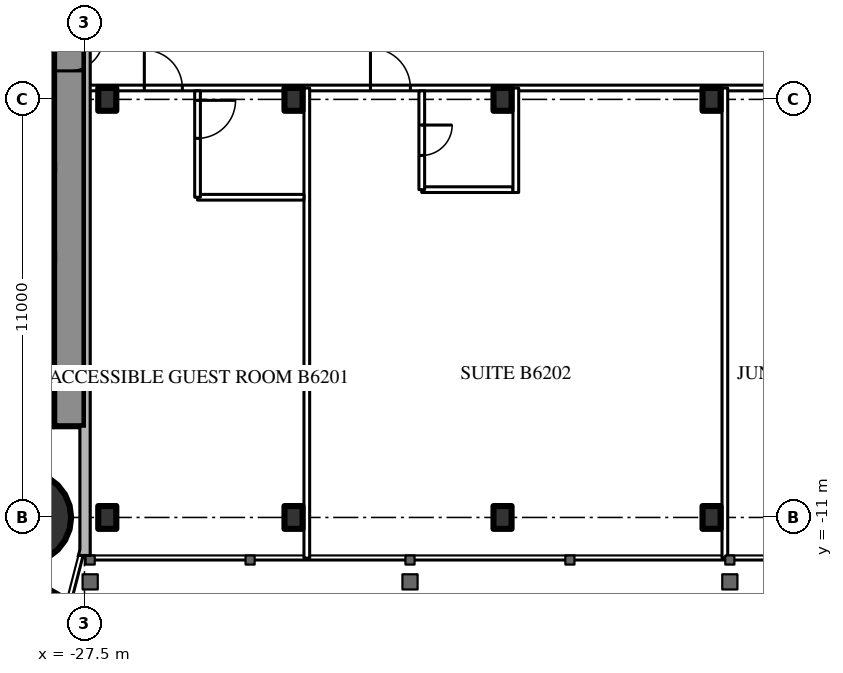
"""IFC4 building model, lengths in metres.
Left out: names, types, materials, properties, quantities, classifications, styles, units other than length and angle.
Written with IfcOpenShell. Run it as: python <this file> out.ifc"""

import sys

from ifc_helpers import new_model, si_unit, direction, frame, frame_2d, origin, origin_2d, place, context, subcontext, project, spatial, rectangle, circle, i_section, extrude, element, fill, save


model = new_model("IFC4")
c1 = context("Model", 3, precision=1e-05, world=origin(), true_north=direction((0.0, 1.0)))
c2 = subcontext(c1, "Body", "Model", "MODEL_VIEW")
j1 = project(units=[si_unit("LENGTHUNIT", "METRE"), si_unit("PLANEANGLEUNIT", "RADIAN")], contexts=[c1])
p1 = place(None, origin())
s1 = spatial("IfcSite", under=j1, at=p1, CompositionType="ELEMENT")
p2 = place(p1, origin())
s2 = spatial("IfcBuilding", under=s1, at=p2, CompositionType="ELEMENT")
p3 = place(p2, frame((0.0, 0.0, 233.3)))
s3 = spatial("IfcBuildingStorey", under=s2, at=p3, CompositionType="ELEMENT", Elevation=233.3)
p4 = place(p3, frame((-29.05, -11.0, 0.0), z_axis=(0.0, 0.0, 1.0), x_axis=(1.0, 0.0, 0.0)))
e1 = element("IfcColumn", 1, at=p4, inside=s3, PredefinedType="COLUMN", context=c2, shape_type="SweptSolid", body=[
    extrude(circle(Radius=1.2, at=origin_2d()), origin(), (0.0, 0.0, 1.0), 3.6),
])
p5 = place(p3, frame((-27.9, 8.6, 0.0), z_axis=(0.0, 0.0, 1.0), x_axis=(0.0, -1.0, 0.0)))
e2 = element("IfcWall", 2, at=p5, inside=s3, PredefinedType="SHEAR", context=c2, shape_type="SweptSolid", body=[
    extrude(rectangle(XDim=17.2, YDim=0.8, at=frame_2d((8.6, 0.0))), origin(), (0.0, 0.0, 1.0), 3.6),
])
p6 = place(p5, frame((6.95, 0.0, 0.0)))
e3 = element("IfcOpeningElement", 3, at=p6, cuts=e2, PredefinedType="OPENING", context=c2, shape_type="SweptSolid", body=[
    extrude(rectangle(XDim=0.9, YDim=2.2, at=frame_2d((0.45, 1.1))), frame((0.0, 0.41, 0.0), z_axis=(0.0, -1.0, 0.0), x_axis=(1.0, 0.0, 0.0)), (0.0, 0.0, 1.0), 0.82),
])
p7 = place(p3, frame((-28.3, -8.0, 0.0), z_axis=(0.0, 0.0, 1.0), x_axis=(-1.0, 0.0, 0.0)))
e4 = element("IfcWall", 4, at=p7, inside=s3, PredefinedType="SHEAR", context=c2, shape_type="SweptSolid", body=[
    extrude(rectangle(XDim=8.4, YDim=1.2, at=frame_2d((4.2, 0.0))), origin(), (0.0, 0.0, 1.0), 3.6),
])
p8 = place(p7, frame((0.25, 0.0, 0.0)))
e5 = element("IfcOpeningElement", 5, at=p8, cuts=e4, PredefinedType="OPENING", context=c2, shape_type="SweptSolid", body=[
    extrude(rectangle(XDim=1.0, YDim=2.2, at=frame_2d((0.5, 1.1))), frame((0.0, 0.61, 0.0), z_axis=(0.0, -1.0, 0.0), x_axis=(1.0, 0.0, 0.0)), (0.0, 0.0, 1.0), 1.22),
])
p9 = place(p3, frame((-28.3, -4.15, 0.0), z_axis=(0.0, 0.0, 1.0), x_axis=(-1.0, 0.0, 0.0)))
e6 = element("IfcWall", 6, at=p9, inside=s3, PredefinedType="SHEAR", context=c2, shape_type="SweptSolid", body=[
    extrude(rectangle(XDim=8.4, YDim=0.3, at=frame_2d((4.2, 0.0))), origin(), (0.0, 0.0, 1.0), 3.6),
])
p10 = place(p3, frame((-28.3, -1.775, 0.0), z_axis=(0.0, 0.0, 1.0), x_axis=(-1.0, 0.0, 0.0)))
e7 = element("IfcWall", 7, at=p10, inside=s3, PredefinedType="SHEAR", context=c2, shape_type="SweptSolid", body=[
    extrude(rectangle(XDim=2.9, YDim=0.25, at=frame_2d((1.45, 0.0))), origin(), (0.0, 0.0, 1.0), 3.6),
])
p11 = place(p3, frame((-27.2, 14.3, 0.0), z_axis=(0.0, 0.0, 1.0), x_axis=(-0.866026593062, -0.499997940104, 0.0)))
e8 = element("IfcWall", 8, at=p11, inside=s3, PredefinedType="SHEAR", context=c2, shape_type="SweptSolid", body=[
    extrude(rectangle(XDim=28.946, YDim=1.2, at=frame_2d((14.473, 0.0))), origin(), (0.0, 0.0, 1.0), 3.6),
])
p12 = place(p11, frame((4.6, 0.0, 0.0)))
e9 = element("IfcOpeningElement", 9, at=p12, cuts=e8, PredefinedType="OPENING", context=c2, shape_type="SweptSolid", body=[
    extrude(rectangle(XDim=1.0, YDim=2.2, at=frame_2d((0.5, 1.1))), frame((0.0, 0.61, 0.0), z_axis=(0.0, -1.0, 0.0), x_axis=(1.0, 0.0, 0.0)), (0.0, 0.0, 1.0), 1.22),
])
p13 = place(p11, frame((13.395, 0.0, 0.0)))
e10 = element("IfcOpeningElement", 10, at=p13, cuts=e8, PredefinedType="OPENING", context=c2, shape_type="SweptSolid", body=[
    extrude(rectangle(XDim=1.8, YDim=2.2, at=frame_2d((0.9, 1.1))), frame((0.0, 0.61, 0.0), z_axis=(0.0, -1.0, 0.0), x_axis=(1.0, 0.0, 0.0)), (0.0, 0.0, 1.0), 1.22),
])
p14 = place(p3, frame((-27.2, -14.3, 0.0), z_axis=(0.0, 0.0, 1.0), x_axis=(-0.866024021859, 0.500002393557, 0.0)))
e11 = element("IfcWall", 11, at=p14, inside=s3, PredefinedType="SHEAR", context=c2, shape_type="SweptSolid", body=[
    extrude(rectangle(XDim=27.907, YDim=1.2, at=frame_2d((13.954, 0.0))), origin(), (0.0, 0.0, 1.0), 3.6),
])
p15 = place(p14, frame((4.6, 0.0, 0.0)))
e12 = element("IfcOpeningElement", 12, at=p15, cuts=e11, PredefinedType="OPENING", context=c2, shape_type="SweptSolid", body=[
    extrude(rectangle(XDim=1.0, YDim=2.2, at=frame_2d((0.5, 1.1))), frame((0.0, 0.61, 0.0), z_axis=(0.0, -1.0, 0.0), x_axis=(1.0, 0.0, 0.0)), (0.0, 0.0, 1.0), 1.22),
])
p16 = place(p14, frame((13.395, 0.0, 0.0)))
e13 = element("IfcOpeningElement", 13, at=p16, cuts=e11, PredefinedType="OPENING", context=c2, shape_type="SweptSolid", body=[
    extrude(rectangle(XDim=1.8, YDim=2.2, at=frame_2d((0.9, 1.1))), frame((0.0, 0.61, 0.0), z_axis=(0.0, -1.0, 0.0), x_axis=(1.0, 0.0, 0.0)), (0.0, 0.0, 1.0), 1.22),
])
for number, where, z_axis, x_axis in (
    (14, (-26.9, -11.0, 0.0), (0.0, 0.0, 1.0), (1.0, 0.0, 0.0)),
    (15, (-22.0, -11.0, 0.0), (0.0, 0.0, 1.0), (1.0, 0.0, 0.0)),
    (16, (-16.5, -11.0, 0.0), (0.0, 0.0, 1.0), (1.0, 0.0, 0.0)),
    (17, (-11.0, -11.0, 0.0), (0.0, 0.0, 1.0), (1.0, 0.0, 0.0)),
    (18, (-26.9, 0.0, 0.0), (0.0, 0.0, 1.0), (1.0, 0.0, 0.0)),
    (19, (-22.0, 0.0, 0.0), (0.0, 0.0, 1.0), (1.0, 0.0, 0.0)),
    (20, (-16.5, 0.0, 0.0), (0.0, 0.0, 1.0), (1.0, 0.0, 0.0)),
    (21, (-11.0, 0.0, 0.0), (0.0, 0.0, 1.0), (1.0, 0.0, 0.0)),
):
    element("IfcColumn", number, at=place(p3, frame(where, z_axis=z_axis, x_axis=x_axis)), inside=s3, PredefinedType="COLUMN", context=c2, shape_type="SweptSolid", body=[
        extrude(i_section(OverallWidth=0.476, OverallDepth=0.6, WebThickness=0.1, FlangeThickness=0.14, FilletRadius=0.02, at=origin_2d()), origin(), (0.0, 0.0, 1.0), 3.6),
    ])
p17 = place(p3, frame((-27.5, 0.3, 0.0), z_axis=(0.0, 0.0, 1.0), x_axis=(1.0, 0.0, 0.0)))
e22 = element("IfcWall", 22, at=p17, inside=s3, PredefinedType="PARTITIONING", context=c2, shape_type="SweptSolid", body=[
    extrude(rectangle(XDim=55.0, YDim=0.15, at=frame_2d((27.5, 0.0))), origin(), (0.0, 0.0, 1.0), 2.4),
])
p18 = place(p17, frame((1.575, 0.0, 0.0)))
e23 = element("IfcOpeningElement", 23, at=p18, cuts=e22, PredefinedType="OPENING", context=c2, shape_type="SweptSolid", body=[
    extrude(rectangle(XDim=1.0, YDim=2.2, at=frame_2d((0.5, 1.1))), frame((0.0, 0.085, 0.0), z_axis=(0.0, -1.0, 0.0), x_axis=(1.0, 0.0, 0.0)), (0.0, 0.0, 1.0), 0.17),
])
p19 = place(p17, frame((7.525, 0.0, 0.0)))
e24 = element("IfcOpeningElement", 24, at=p19, cuts=e22, PredefinedType="OPENING", context=c2, shape_type="SweptSolid", body=[
    extrude(rectangle(XDim=1.05, YDim=2.4, at=frame_2d((0.525, 1.2))), frame((0.0, 0.085, 0.0), z_axis=(0.0, -1.0, 0.0), x_axis=(1.0, 0.0, 0.0)), (0.0, 0.0, 1.0), 0.17),
])
p20 = place(p17, frame((18.525, 0.0, 0.0)))
e25 = element("IfcOpeningElement", 25, at=p20, cuts=e22, PredefinedType="OPENING", context=c2, shape_type="SweptSolid", body=[
    extrude(rectangle(XDim=1.05, YDim=2.4, at=frame_2d((0.525, 1.2))), frame((0.0, 0.085, 0.0), z_axis=(0.0, -1.0, 0.0), x_axis=(1.0, 0.0, 0.0)), (0.0, 0.0, 1.0), 0.17),
])
p21 = place(p17, frame((24.025, 0.0, 0.0)))
e26 = element("IfcOpeningElement", 26, at=p21, cuts=e22, PredefinedType="OPENING", context=c2, shape_type="SweptSolid", body=[
    extrude(rectangle(XDim=1.05, YDim=2.4, at=frame_2d((0.525, 1.2))), frame((0.0, 0.085, 0.0), z_axis=(0.0, -1.0, 0.0), x_axis=(1.0, 0.0, 0.0)), (0.0, 0.0, 1.0), 0.17),
])
p22 = place(p17, frame((35.025, 0.0, 0.0)))
e27 = element("IfcOpeningElement", 27, at=p22, cuts=e22, PredefinedType="OPENING", context=c2, shape_type="SweptSolid", body=[
    extrude(rectangle(XDim=1.05, YDim=2.4, at=frame_2d((0.525, 1.2))), frame((0.0, 0.085, 0.0), z_axis=(0.0, -1.0, 0.0), x_axis=(1.0, 0.0, 0.0)), (0.0, 0.0, 1.0), 0.17),
])
p23 = place(p17, frame((40.525, 0.0, 0.0)))
e28 = element("IfcOpeningElement", 28, at=p23, cuts=e22, PredefinedType="OPENING", context=c2, shape_type="SweptSolid", body=[
    extrude(rectangle(XDim=1.05, YDim=2.4, at=frame_2d((0.525, 1.2))), frame((0.0, 0.085, 0.0), z_axis=(0.0, -1.0, 0.0), x_axis=(1.0, 0.0, 0.0)), (0.0, 0.0, 1.0), 0.17),
])
p24 = place(p17, frame((52.525, 0.0, 0.0)))
e29 = element("IfcOpeningElement", 29, at=p24, cuts=e22, PredefinedType="OPENING", context=c2, shape_type="SweptSolid", body=[
    extrude(rectangle(XDim=1.05, YDim=2.4, at=frame_2d((0.525, 1.2))), frame((0.0, 0.085, 0.0), z_axis=(0.0, -1.0, 0.0), x_axis=(1.0, 0.0, 0.0)), (0.0, 0.0, 1.0), 0.17),
])
for number, where, z_axis, x_axis in (
    (30, (-21.65, -12.07, 0.0), (0.0, 0.0, 1.0), (0.0, 1.0, 0.0)),
    (31, (-10.65, -12.07, 0.0), (0.0, 0.0, 1.0), (0.0, 1.0, 0.0)),
):
    element("IfcWall", number, at=place(p3, frame(where, z_axis=z_axis, x_axis=x_axis)), inside=s3, PredefinedType="PARTITIONING", context=c2, shape_type="SweptSolid", body=[
        extrude(rectangle(XDim=12.37, YDim=0.15, at=frame_2d((6.185, 0.0))), origin(), (0.0, 0.0, 1.0), 3.4),
    ])
p25 = place(p3, frame((-24.525, -2.575, 0.0), z_axis=(0.0, 0.0, 1.0), x_axis=(1.0, 0.0, 0.0)))
e32 = element("IfcWall", 32, at=p25, inside=s3, PredefinedType="PARTITIONING", context=c2, shape_type="SweptSolid", body=[
    extrude(rectangle(XDim=2.8, YDim=0.15, at=frame_2d((1.4, 0.0))), origin(), (0.0, 0.0, 1.0), 3.4),
])
p26 = place(p3, frame((-24.525, -2.575, 0.0), z_axis=(0.0, 0.0, 1.0), x_axis=(0.0, 1.0, 0.0)))
e33 = element("IfcWall", 33, at=p26, inside=s3, PredefinedType="PARTITIONING", context=c2, shape_type="SweptSolid", body=[
    extrude(rectangle(XDim=2.8, YDim=0.15, at=frame_2d((1.4, 0.0))), origin(), (0.0, 0.0, 1.0), 3.4),
])
p27 = place(p26, frame((1.55, 0.0, 0.0)))
e34 = element("IfcOpeningElement", 34, at=p27, cuts=e33, PredefinedType="OPENING", context=c2, shape_type="SweptSolid", body=[
    extrude(rectangle(XDim=1.0, YDim=2.2, at=frame_2d((0.5, 1.1))), frame((0.0, 0.085, 0.0), z_axis=(0.0, -1.0, 0.0), x_axis=(1.0, 0.0, 0.0)), (0.0, 0.0, 1.0), 0.17),
])
p28 = place(p3, frame((-18.625, -2.375, 0.0), z_axis=(0.0, 0.0, 1.0), x_axis=(1.0, 0.0, 0.0)))
e35 = element("IfcWall", 35, at=p28, inside=s3, PredefinedType="PARTITIONING", context=c2, shape_type="SweptSolid", body=[
    extrude(rectangle(XDim=2.4, YDim=0.15, at=frame_2d((1.2, 0.0))), origin(), (0.0, 0.0, 1.0), 3.4),
])
p29 = place(p3, frame((-18.625, -2.375, 0.0), z_axis=(0.0, 0.0, 1.0), x_axis=(0.0, 1.0, 0.0)))
e36 = element("IfcWall", 36, at=p29, inside=s3, PredefinedType="PARTITIONING", context=c2, shape_type="SweptSolid", body=[
    extrude(rectangle(XDim=2.6, YDim=0.15, at=frame_2d((1.3, 0.0))), origin(), (0.0, 0.0, 1.0), 3.4),
])
p30 = place(p29, frame((0.9, 0.0, 0.0)))
e37 = element("IfcOpeningElement", 37, at=p30, cuts=e36, PredefinedType="OPENING", context=c2, shape_type="SweptSolid", body=[
    extrude(rectangle(XDim=0.8, YDim=2.2, at=frame_2d((0.4, 1.1))), frame((0.0, 0.085, 0.0), z_axis=(0.0, -1.0, 0.0), x_axis=(1.0, 0.0, 0.0)), (0.0, 0.0, 1.0), 0.17),
])
p31 = place(p3, frame((-16.15, -2.45, 0.0), z_axis=(0.0, 0.0, 1.0), x_axis=(0.0, 1.0, 0.0)))
e38 = element("IfcWall", 38, at=p31, inside=s3, PredefinedType="PARTITIONING", context=c2, shape_type="SweptSolid", body=[
    extrude(rectangle(XDim=2.75, YDim=0.15, at=frame_2d((1.375, 0.0))), origin(), (0.0, 0.0, 1.0), 3.4),
])
p32 = place(p6, origin())
e39 = element("IfcDoor", 39, at=p32, inside=s3, OperationType="SINGLE_SWING_LEFT", PredefinedType="DOOR", context=c2, shape_type="SweptSolid", body=[
    extrude(rectangle(XDim=0.9, YDim=2.2, at=frame_2d((0.45, 1.1))), frame((0.0, 0.025, 0.0), z_axis=(0.0, -1.0, 0.0), x_axis=(1.0, 0.0, 0.0)), (0.0, 0.0, 1.0), 0.05),
])
fill(e3, e39)
p33 = place(p27, origin())
e40 = element("IfcDoor", 40, at=p33, inside=s3, OperationType="SINGLE_SWING_RIGHT", PredefinedType="DOOR", context=c2, shape_type="SweptSolid", body=[
    extrude(rectangle(XDim=1.0, YDim=2.2, at=frame_2d((0.5, 1.1))), frame((0.0, 0.025, 0.0), z_axis=(0.0, -1.0, 0.0), x_axis=(1.0, 0.0, 0.0)), (0.0, 0.0, 1.0), 0.05),
])
fill(e34, e40)
p34 = place(p18, origin())
e41 = element("IfcDoor", 41, at=p34, inside=s3, OperationType="SINGLE_SWING_LEFT", PredefinedType="DOOR", context=c2, shape_type="SweptSolid", body=[
    extrude(rectangle(XDim=1.0, YDim=2.2, at=frame_2d((0.5, 1.1))), frame((0.0, 0.025, 0.0), z_axis=(0.0, -1.0, 0.0), x_axis=(1.0, 0.0, 0.0)), (0.0, 0.0, 1.0), 0.05),
])
fill(e23, e41)
p35 = place(p30, origin())
e42 = element("IfcDoor", 42, at=p35, inside=s3, OperationType="SINGLE_SWING_RIGHT", PredefinedType="DOOR", context=c2, shape_type="SweptSolid", body=[
    extrude(rectangle(XDim=0.8, YDim=2.2, at=frame_2d((0.4, 1.1))), frame((0.0, 0.025, 0.0), z_axis=(0.0, -1.0, 0.0), x_axis=(1.0, 0.0, 0.0)), (0.0, 0.0, 1.0), 0.05),
])
fill(e37, e42)
p36 = place(p19, origin())
e43 = element("IfcDoor", 43, at=p36, inside=s3, OperationType="SINGLE_SWING_LEFT", PredefinedType="DOOR", context=c2, shape_type="SweptSolid", body=[
    extrude(rectangle(XDim=1.05, YDim=2.4, at=frame_2d((0.525, 1.2))), frame((0.0, 0.025, 0.0), z_axis=(0.0, -1.0, 0.0), x_axis=(1.0, 0.0, 0.0)), (0.0, 0.0, 1.0), 0.05),
])
fill(e24, e43)
save(model, sys.argv[1])
